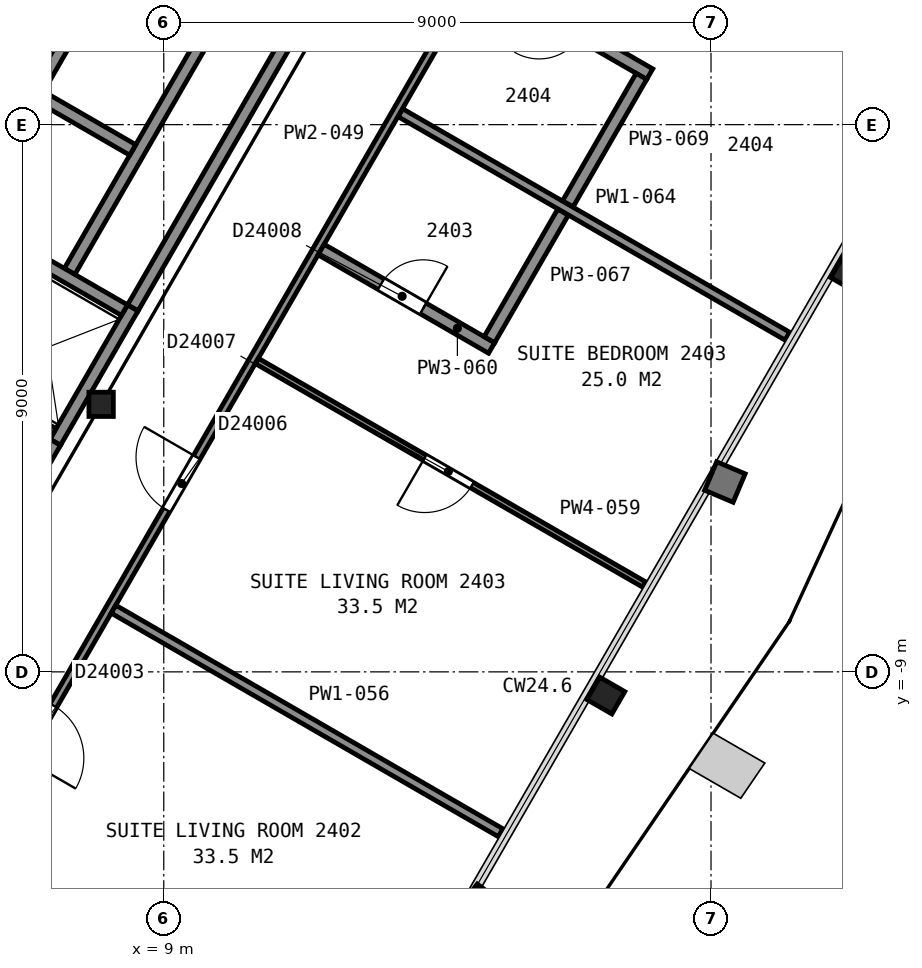
"""IFC4 building model, lengths in metres.
Left out: names, types, materials, properties, quantities, classifications, styles, units other than length and angle.
Written with IfcOpenShell. Run it as: python <this file> out.ifc"""

import sys

from ifc_helpers import new_model, si_unit, direction, frame, frame_2d, origin, origin_2d, place, context, subcontext, project, spatial, rectangle, i_section, extrude, element, fill, save


model = new_model("IFC4")
c1 = context("Model", 3, precision=1e-05, world=origin(), true_north=direction((0.0, 1.0)))
c2 = subcontext(c1, "Body", "Model", "MODEL_VIEW")
j1 = project(units=[si_unit("LENGTHUNIT", "METRE"), si_unit("PLANEANGLEUNIT", "RADIAN")], contexts=[c1])
p1 = place(None, origin())
s1 = spatial("IfcSite", under=j1, at=p1, CompositionType="ELEMENT")
p2 = place(p1, origin())
s2 = spatial("IfcBuilding", under=s1, at=p2, CompositionType="ELEMENT")
p3 = place(p2, frame((0.0, 0.0, 103.6)))
s3 = spatial("IfcBuildingStorey", under=s2, at=p3, CompositionType="ELEMENT", Elevation=103.6)
p4 = place(p3, frame((16.27, -9.39, 0.035), z_axis=(0.0, 0.0, 1.0), x_axis=(-0.5, -0.866025403784, 0.0)))
e1 = element("IfcColumn", 1, at=p4, inside=s3, PredefinedType="COLUMN", context=c2, shape_type="SweptSolid", body=[
    extrude(i_section(OverallWidth=0.424, OverallDepth=0.475, WebThickness=0.048, FlangeThickness=0.077, FilletRadius=0.015, at=origin_2d()), origin(), (0.0, 0.0, 1.0), 3.565),
])
p5 = place(p3, frame((20.28, -2.45, 0.04), z_axis=(0.0, 0.0, 1.0), x_axis=(-0.5, -0.866025403784, 0.0)))
e2 = element("IfcColumn", 2, at=p5, inside=s3, PredefinedType="COLUMN", context=c2, shape_type="SweptSolid", body=[
    extrude(i_section(OverallWidth=0.424, OverallDepth=0.475, WebThickness=0.048, FlangeThickness=0.077, FilletRadius=0.015, at=origin_2d()), origin(), (0.0, 0.0, 1.0), 3.56),
])
p6 = place(p3, frame((7.97, -4.6, 0.0), z_axis=(0.0, 0.0, 1.0), x_axis=(1.0, 0.0, 0.0)))
e3 = element("IfcColumn", 3, at=p6, inside=s3, PredefinedType="COLUMN", context=c2, shape_type="SweptSolid", body=[
    extrude(i_section(OverallWidth=0.401, OverallDepth=0.399, WebThickness=0.025, FlangeThickness=0.04, FilletRadius=0.015, at=origin_2d()), origin(), (0.0, 0.0, 1.0), 3.6),
])
p7 = place(p3, frame((7.216, -5.222, 0.0), z_axis=(0.0, 0.0, 1.0), x_axis=(0.499990435942, 0.866030925526, 0.0)))
e4 = element("IfcWall", 4, at=p7, inside=s3, PredefinedType="PARTITIONING", context=c2, shape_type="SweptSolid", body=[
    extrude(rectangle(XDim=2.55, YDim=0.2, at=frame_2d((1.275, 0.0))), origin(), (0.0, 0.0, 1.0), 3.6),
])
p8 = place(p3, frame((7.451, -2.414, 0.0), z_axis=(0.0, 0.0, 1.0), x_axis=(0.500016218704, 0.866016039709, 0.0)))
e5 = element("IfcWall", 5, at=p8, inside=s3, PredefinedType="PARTITIONING", context=c2, shape_type="SweptSolid", body=[
    extrude(rectangle(XDim=4.7, YDim=0.2, at=frame_2d((2.35, 0.0))), origin(), (0.0, 0.0, 1.0), 3.6),
])
p9 = place(p3, frame((5.663, -1.612, 0.0), z_axis=(0.0, 0.0, 1.0), x_axis=(0.49998122708, 0.866036242063, 0.0)))
e6 = element("IfcWall", 6, at=p9, inside=s3, PredefinedType="PARTITIONING", context=c2, shape_type="SweptSolid", body=[
    extrude(rectangle(XDim=4.9, YDim=0.2, at=frame_2d((2.45, 0.0))), origin(), (0.0, 0.0, 1.0), 3.6),
])
p10 = place(p3, frame((8.49, -0.416, 0.0), z_axis=(0.0, 0.0, 1.0), x_axis=(-0.866036909293, 0.499980071345, 0.0)))
e7 = element("IfcWall", 7, at=p10, inside=s3, PredefinedType="PARTITIONING", context=c2, shape_type="SweptSolid", body=[
    extrude(rectangle(XDim=1.75, YDim=0.2, at=frame_2d((0.875, 0.0))), origin(), (0.0, 0.0, 1.0), 3.6),
])
p11 = place(p3, frame((8.354, -3.051, 0.0), z_axis=(0.0, 0.0, 1.0), x_axis=(-0.866060182126, 0.499939757307, 0.0)))
e8 = element("IfcWall", 8, at=p11, inside=s3, PredefinedType="PARTITIONING", context=c2, shape_type="SweptSolid", body=[
    extrude(rectangle(XDim=2.95, YDim=0.2, at=frame_2d((1.475, 0.0))), origin(), (0.0, 0.0, 1.0), 3.6),
])
p12 = place(p3, frame((7.179, -5.086, 0.0), z_axis=(0.0, 0.0, 1.0), x_axis=(-0.866036909293, 0.499980071345, 0.0)))
e9 = element("IfcWall", 9, at=p12, inside=s3, PredefinedType="PARTITIONING", context=c2, shape_type="SweptSolid", body=[
    extrude(rectangle(XDim=1.75, YDim=0.2, at=frame_2d((0.875, 0.0))), origin(), (0.0, 0.0, 1.0), 3.6),
])
p13 = place(p3, frame((5.906, -7.49, 0.0), z_axis=(0.0, 0.0, 1.0), x_axis=(0.500252727967, 0.865879442048, 0.0)))
e10 = element("IfcWall", 10, at=p13, inside=s3, PredefinedType="PARTITIONING", context=c2, shape_type="SweptSolid", body=[
    extrude(rectangle(XDim=2.617, YDim=0.2, at=frame_2d((1.309, 0.0))), origin(), (0.0, 0.0, 1.0), 3.35),
])
p14 = place(p3, frame((8.492, -3.012, 0.0), z_axis=(0.0, 0.0, 1.0), x_axis=(0.499972957231, 0.866041016371, 0.0)))
e11 = element("IfcWall", 11, at=p14, inside=s3, PredefinedType="PARTITIONING", context=c2, shape_type="SweptSolid", body=[
    extrude(rectangle(XDim=10.349, YDim=0.2, at=frame_2d((5.174, 0.0))), origin(), (0.0, 0.0, 1.0), 3.35),
])
p15 = place(p3, frame((15.684, 5.165, 0.0), z_axis=(0.0, 0.0, 1.0), x_axis=(-0.500027787016, -0.866009360349, 0.0)))
e12 = element("IfcWall", 12, at=p15, inside=s3, PredefinedType="PARTITIONING", context=c2, shape_type="SweptSolid", body=[
    extrude(rectangle(XDim=23.856, YDim=0.125, at=frame_2d((11.928, 0.0))), origin(), (0.0, 0.0, 1.0), 2.613),
])
p16 = place(p15, frame((16.996, 0.0, 0.0)))
e13 = element("IfcOpeningElement", 13, at=p16, cuts=e12, PredefinedType="OPENING", context=c2, shape_type="SweptSolid", body=[
    extrude(rectangle(XDim=1.0, YDim=2.1, at=frame_2d((0.5, 1.05))), frame((0.0, 0.073, 0.0), z_axis=(0.0, -1.0, 0.0), x_axis=(1.0, 0.0, 0.0)), (0.0, 0.0, 1.0), 0.145),
])
p17 = place(p15, frame((12.28, 0.0, 0.0)))
e14 = element("IfcOpeningElement", 14, at=p17, cuts=e12, PredefinedType="OPENING", context=c2, shape_type="SweptSolid", body=[
    extrude(rectangle(XDim=1.0, YDim=2.1, at=frame_2d((0.5, 1.05))), frame((0.0, 0.073, 0.0), z_axis=(0.0, -1.0, 0.0), x_axis=(1.0, 0.0, 0.0)), (0.0, 0.0, 1.0), 0.145),
])
p18 = place(p3, frame((12.183, -15.729, 0.0), z_axis=(0.0, 0.0, 1.0), x_axis=(-0.866066702559, 0.499928461601, 0.0)))
e15 = element("IfcWall", 15, at=p18, inside=s3, PredefinedType="PARTITIONING", context=c2, shape_type="SweptSolid", body=[
    extrude(rectangle(XDim=7.352, YDim=0.1, at=frame_2d((3.676, 0.0))), origin(), (0.0, 0.0, 1.0), 2.613),
])
p19 = place(p18, frame((3.265, 0.0, 0.0)))
e16 = element("IfcOpeningElement", 16, at=p19, cuts=e15, PredefinedType="OPENING", context=c2, shape_type="SweptSolid", body=[
    extrude(rectangle(XDim=0.9, YDim=2.1, at=frame_2d((0.45, 1.05))), frame((0.0, 0.06, 0.0), z_axis=(0.0, -1.0, 0.0), x_axis=(1.0, 0.0, 0.0)), (0.0, 0.0, 1.0), 0.12),
])
p20 = place(p3, frame((8.173, -7.969, 0.0), z_axis=(0.0, 0.0, 1.0), x_axis=(0.86596990005, -0.500096122968, 0.0)))
e17 = element("IfcWall", 17, at=p20, inside=s3, PredefinedType="PARTITIONING", context=c2, shape_type="SweptSolid", body=[
    extrude(rectangle(XDim=7.352, YDim=0.15, at=frame_2d((3.676, 0.0))), origin(), (0.0, 0.0, 1.0), 2.613),
])
p21 = place(p3, frame((10.53, -3.886, 0.0), z_axis=(0.0, 0.0, 1.0), x_axis=(0.8660606245, -0.499938990969, 0.0)))
e18 = element("IfcWall", 18, at=p21, inside=s3, PredefinedType="PARTITIONING", context=c2, shape_type="SweptSolid", body=[
    extrude(rectangle(XDim=7.353, YDim=0.1, at=frame_2d((3.676, 0.0))), origin(), (0.0, 0.0, 1.0), 2.613),
])
p22 = place(p21, frame((3.188, 0.0, 0.0)))
e19 = element("IfcOpeningElement", 19, at=p22, cuts=e18, PredefinedType="OPENING", context=c2, shape_type="SweptSolid", body=[
    extrude(rectangle(XDim=0.9, YDim=2.1, at=frame_2d((0.45, 1.05))), frame((0.0, 0.06, 0.0), z_axis=(0.0, -1.0, 0.0), x_axis=(1.0, 0.0, 0.0)), (0.0, 0.0, 1.0), 0.12),
])
p23 = place(p3, frame((11.588, -2.054, 0.0), z_axis=(0.0, 0.0, 1.0), x_axis=(0.865983377851, -0.500072783988, 0.0)))
e20 = element("IfcWall", 20, at=p23, inside=s3, PredefinedType="PARTITIONING", context=c2, shape_type="SweptSolid", body=[
    extrude(rectangle(XDim=3.237, YDim=0.2, at=frame_2d((1.619, 0.0))), origin(), (0.0, 0.0, 1.0), 2.613),
])
p24 = place(p23, frame((1.137, 0.0, 0.0)))
e21 = element("IfcOpeningElement", 21, at=p24, cuts=e20, PredefinedType="OPENING", context=c2, shape_type="SweptSolid", body=[
    extrude(rectangle(XDim=0.8, YDim=2.1, at=frame_2d((0.4, 1.05))), frame((0.0, 0.11, 0.0), z_axis=(0.0, -1.0, 0.0), x_axis=(1.0, 0.0, 0.0)), (0.0, 0.0, 1.0), 0.22),
])
p25 = place(p3, frame((12.893, 0.195, 0.0), z_axis=(0.0, 0.0, 1.0), x_axis=(0.865995225926, -0.500052265941, 0.0)))
e22 = element("IfcWall", 22, at=p25, inside=s3, PredefinedType="PARTITIONING", context=c2, shape_type="SweptSolid", body=[
    extrude(rectangle(XDim=7.347, YDim=0.15, at=frame_2d((3.674, 0.0))), origin(), (0.0, 0.0, 1.0), 2.613),
])
p26 = place(p3, frame((16.992, 0.831, 0.0), z_axis=(0.0, 0.0, 1.0), x_axis=(-0.866022073929, 0.500005767435, 0.0)))
e23 = element("IfcWall", 23, at=p26, inside=s3, PredefinedType="PARTITIONING", context=c2, shape_type="SweptSolid", body=[
    extrude(rectangle(XDim=3.232, YDim=0.2, at=frame_2d((1.616, 0.0))), origin(), (0.0, 0.0, 1.0), 2.613),
])
p27 = place(p26, frame((1.3, 0.0, 0.0)))
e24 = element("IfcOpeningElement", 24, at=p27, cuts=e23, PredefinedType="OPENING", context=c2, shape_type="SweptSolid", body=[
    extrude(rectangle(XDim=0.8, YDim=2.1, at=frame_2d((0.4, 1.05))), frame((0.0, 0.11, 0.0), z_axis=(0.0, -1.0, 0.0), x_axis=(1.0, 0.0, 0.0)), (0.0, 0.0, 1.0), 0.22),
])
p28 = place(p3, frame((14.355, -3.536, 0.0), z_axis=(0.0, 0.0, 1.0), x_axis=(0.50002218001, 0.866012597771, 0.0)))
e25 = element("IfcWall", 25, at=p28, inside=s3, PredefinedType="PARTITIONING", context=c2, shape_type="SweptSolid", body=[
    extrude(rectangle(XDim=2.421, YDim=0.2, at=frame_2d((1.21, 0.0))), origin(), (0.0, 0.0, 1.0), 2.613),
])
p29 = place(p3, frame((21.613, 0.605, 0.0), z_axis=(0.0, 0.0, 1.0), x_axis=(-0.866021344046, 0.500007031608, 0.0)))
e26 = element("IfcWall", 26, at=p29, inside=s3, PredefinedType="PARTITIONING", context=c2, shape_type="SweptSolid", body=[
    extrude(rectangle(XDim=7.352, YDim=0.1, at=frame_2d((3.676, 0.0))), origin(), (0.0, 0.0, 1.0), 2.613),
])
p30 = place(p29, frame((3.264, 0.0, 0.0)))
e27 = element("IfcOpeningElement", 27, at=p30, cuts=e26, PredefinedType="OPENING", context=c2, shape_type="SweptSolid", body=[
    extrude(rectangle(XDim=0.9, YDim=2.1, at=frame_2d((0.45, 1.05))), frame((0.0, 0.06, 0.0), z_axis=(0.0, -1.0, 0.0), x_axis=(1.0, 0.0, 0.0)), (0.0, 0.0, 1.0), 0.12),
])
p31 = place(p3, frame((15.646, -1.302, 0.0), z_axis=(0.0, 0.0, 1.0), x_axis=(0.499719542643, 0.866187265377, 0.0)))
e28 = element("IfcWall", 28, at=p31, inside=s3, PredefinedType="PARTITIONING", context=c2, shape_type="SweptSolid", body=[
    extrude(rectangle(XDim=2.42, YDim=0.2, at=frame_2d((1.21, 0.0))), origin(), (0.0, 0.0, 1.0), 2.613),
])
p32 = place(p16, origin())
e29 = element("IfcDoor", 29, at=p32, inside=s3, OperationType="SINGLE_SWING_RIGHT", PredefinedType="DOOR", context=c2, shape_type="SweptSolid", body=[
    extrude(rectangle(XDim=1.0, YDim=2.1, at=frame_2d((0.5, 1.05))), frame((0.0, 0.025, 0.0), z_axis=(0.0, -1.0, 0.0), x_axis=(1.0, 0.0, 0.0)), (0.0, 0.0, 1.0), 0.05),
])
fill(e13, e29)
p33 = place(p17, origin())
e30 = element("IfcDoor", 30, at=p33, inside=s3, OperationType="SINGLE_SWING_LEFT", PredefinedType="DOOR", context=c2, shape_type="SweptSolid", body=[
    extrude(rectangle(XDim=1.0, YDim=2.1, at=frame_2d((0.5, 1.05))), frame((0.0, 0.025, 0.0), z_axis=(0.0, -1.0, 0.0), x_axis=(1.0, 0.0, 0.0)), (0.0, 0.0, 1.0), 0.05),
])
fill(e14, e30)
p34 = place(p22, origin())
e31 = element("IfcDoor", 31, at=p34, inside=s3, OperationType="SINGLE_SWING_LEFT", PredefinedType="DOOR", context=c2, shape_type="SweptSolid", body=[
    extrude(rectangle(XDim=0.9, YDim=2.1, at=frame_2d((0.45, 1.05))), frame((0.0, 0.025, 0.0), z_axis=(0.0, -1.0, 0.0), x_axis=(1.0, 0.0, 0.0)), (0.0, 0.0, 1.0), 0.05),
])
fill(e19, e31)
p35 = place(p24, origin())
e32 = element("IfcDoor", 32, at=p35, inside=s3, OperationType="SINGLE_SWING_RIGHT", PredefinedType="DOOR", context=c2, shape_type="SweptSolid", body=[
    extrude(rectangle(XDim=0.8, YDim=2.1, at=frame_2d((0.4, 1.05))), frame((0.0, 0.025, 0.0), z_axis=(0.0, -1.0, 0.0), x_axis=(1.0, 0.0, 0.0)), (0.0, 0.0, 1.0), 0.05),
])
fill(e21, e32)
save(model, sys.argv[1])
